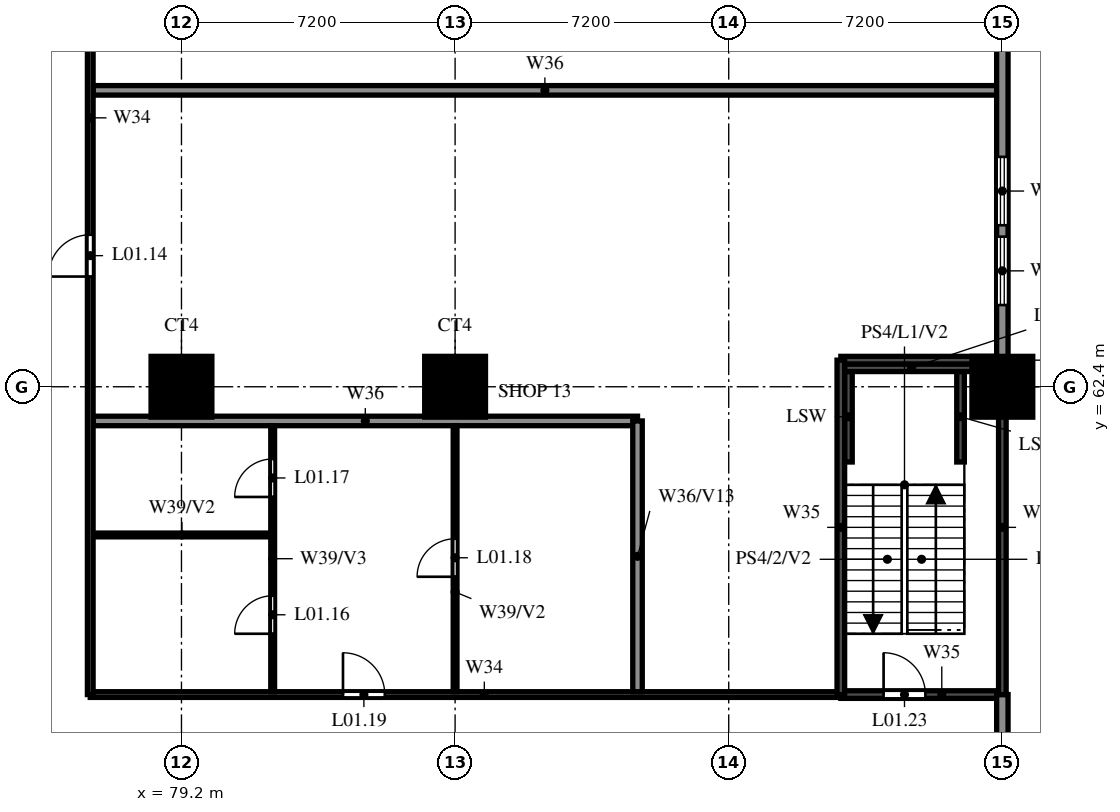
"""IFC4 building model, lengths in metres.
Left out: names, types, materials, properties, quantities, classifications, styles, units other than length and angle.
Written with IfcOpenShell. Run it as: python <this file> out.ifc"""

import sys

from ifc_helpers import new_model, si_unit, direction, frame, frame_2d, origin, origin_2d, place, context, subcontext, project, spatial, rectangle, circle, extrude, source, transform, mapped, element, fill, save


model = new_model("IFC4")
c1 = context("Model", 3, precision=1e-05, world=origin(), true_north=direction((0.0, 1.0)))
c2 = subcontext(c1, "Body", "Model", "MODEL_VIEW")
j1 = project(units=[si_unit("LENGTHUNIT", "METRE"), si_unit("PLANEANGLEUNIT", "RADIAN")], contexts=[c1])
p1 = place(None, origin())
s1 = spatial("IfcSite", under=j1, at=p1, CompositionType="ELEMENT")
p2 = place(p1, origin())
s2 = spatial("IfcBuilding", under=s1, at=p2, CompositionType="ELEMENT")
p3 = place(p2, frame((0.0, 0.0, 7.8)))
s3 = spatial("IfcBuildingStorey", under=s2, at=p3, CompositionType="ELEMENT", Elevation=7.8)
m1 = source(origin(), c2, "Body", "SweptSolid", [
    extrude(circle(Radius=0.8, at=origin_2d()), origin(), (0.0, 0.0, 1.0), 5.0),
])
for number, where, z_axis, x_axis in (
    (1, (79.2, 62.4, 0.0), (0.0, 0.0, 1.0), (1.0, 0.0, 0.0)),
    (2, (86.4, 62.4, 0.0), (0.0, 0.0, 1.0), (1.0, 0.0, 0.0)),
    (3, (100.8, 62.4, 0.0), (0.0, 0.0, 1.0), (1.0, 0.0, 0.0)),
):
    element("IfcColumn", number, at=place(p3, frame(where, z_axis=z_axis, x_axis=x_axis)), inside=s3, PredefinedType="COLUMN", context=c2, shape_type="MappedRepresentation", body=[
        mapped(m1, transform((0.0, 0.0, 0.0))),
    ])
for number, where, z_axis, x_axis in (
    (4, (96.75, 60.42, 0.0), (0.0, 0.0, 1.0), (0.0, 1.0, 0.0)),
    (5, (99.7, 60.42, 0.0), (0.0, 0.0, 1.0), (0.0, 1.0, 0.0)),
):
    element("IfcWall", number, at=place(p3, frame(where, z_axis=z_axis, x_axis=x_axis)), inside=s3, PredefinedType="SOLIDWALL", context=c2, shape_type="SweptSolid", body=[
        extrude(rectangle(XDim=2.38, YDim=0.2, at=frame_2d((1.19, 0.0))), origin(), (0.0, 0.0, 1.0), 2.5),
    ])
p4 = place(p3, frame((96.65, 62.9, 0.0), z_axis=(0.0, 0.0, 1.0), x_axis=(1.0, 0.0, 0.0)))
e6 = element("IfcWall", 6, at=p4, inside=s3, PredefinedType="SOLIDWALL", context=c2, shape_type="SweptSolid", body=[
    extrude(rectangle(XDim=3.526, YDim=0.2, at=frame_2d((1.763, 0.0))), origin(), (0.0, 0.0, 1.0), 2.5),
])
p5 = place(p3, frame((76.8, 54.3, 0.0), z_axis=(0.0, 0.0, 1.0), x_axis=(1.0, 0.0, 0.0)))
e7 = element("IfcWall", 7, at=p5, inside=s3, PredefinedType="PARTITIONING", context=c2, shape_type="SweptSolid", body=[
    extrude(rectangle(XDim=19.75, YDim=0.15, at=frame_2d((9.875, 0.0))), origin(), (0.0, 0.0, 1.0), 3.8),
])
p6 = place(p5, frame((6.65, 0.0, 0.0)))
e8 = element("IfcOpeningElement", 8, at=p6, cuts=e7, PredefinedType="OPENING", context=c2, shape_type="SweptSolid", body=[
    extrude(rectangle(XDim=1.1, YDim=2.1, at=frame_2d((0.55, 1.05))), frame((0.0, 0.085, 0.0), z_axis=(0.0, -1.0, 0.0), x_axis=(1.0, 0.0, 0.0)), (0.0, 0.0, 1.0), 0.17),
])
p7 = place(p3, frame((96.55, 54.3, 0.0), z_axis=(0.0, 0.0, 1.0), x_axis=(1.0, 0.0, 0.0)))
e9 = element("IfcWall", 9, at=p7, inside=s3, PredefinedType="SOLIDWALL", context=c2, shape_type="SweptSolid", body=[
    extrude(rectangle(XDim=4.25, YDim=0.2, at=frame_2d((2.125, 0.0))), origin(), (0.0, 0.0, 1.0), 5.0),
])
p8 = place(p7, frame((1.125, 0.0, 0.0)))
e10 = element("IfcOpeningElement", 10, at=p8, cuts=e9, PredefinedType="OPENING", context=c2, shape_type="SweptSolid", body=[
    extrude(rectangle(XDim=1.1, YDim=2.1, at=frame_2d((0.55, 1.05))), frame((0.0, 0.11, 0.0), z_axis=(0.0, -1.0, 0.0), x_axis=(1.0, 0.0, 0.0)), (0.0, 0.0, 1.0), 0.22),
])
p9 = place(p3, frame((76.875, 58.5, 0.0), z_axis=(0.0, 0.0, 1.0), x_axis=(1.0, 0.0, 0.0)))
e11 = element("IfcWall", 11, at=p9, inside=s3, PredefinedType="PARTITIONING", context=c2, shape_type="SweptSolid", body=[
    extrude(rectangle(XDim=4.675, YDim=0.1, at=frame_2d((2.337, 0.0))), origin(), (0.0, 0.0, 1.0), 3.8),
])
p10 = place(p3, frame((76.875, 61.5, 0.0), z_axis=(0.0, 0.0, 1.0), x_axis=(1.0, 0.0, 0.0)))
e12 = element("IfcWall", 12, at=p10, inside=s3, PredefinedType="SOLIDWALL", context=c2, shape_type="SweptSolid", body=[
    extrude(rectangle(XDim=14.325, YDim=0.25, at=frame_2d((7.163, 0.0))), origin(), (0.0, 0.0, 1.0), 3.8),
])
p11 = place(p3, frame((96.55, 63.1, 0.0), z_axis=(0.0, 0.0, 1.0), x_axis=(1.0, 0.0, 0.0)))
e13 = element("IfcWall", 13, at=p11, inside=s3, PredefinedType="SOLIDWALL", context=c2, shape_type="SweptSolid", body=[
    extrude(rectangle(XDim=4.25, YDim=0.2, at=frame_2d((2.125, 0.0))), origin(), (0.0, 0.0, 1.0), 5.0),
])
p12 = place(p3, frame((76.875, 70.2, 0.0), z_axis=(0.0, 0.0, 1.0), x_axis=(1.0, 0.0, 0.0)))
e14 = element("IfcWall", 14, at=p12, inside=s3, PredefinedType="SOLIDWALL", context=c2, shape_type="SweptSolid", body=[
    extrude(rectangle(XDim=23.775, YDim=0.25, at=frame_2d((11.887, 0.0))), origin(), (0.0, 0.0, 1.0), 3.8),
])
p13 = place(p3, frame((76.8, 54.3, 0.0), z_axis=(0.0, 0.0, 1.0), x_axis=(0.0, 1.0, 0.0)))
e15 = element("IfcWall", 15, at=p13, inside=s3, PredefinedType="PARTITIONING", context=c2, shape_type="SweptSolid", body=[
    extrude(rectangle(XDim=31.95, YDim=0.15, at=frame_2d((15.975, 0.0))), origin(), (0.0, 0.0, 1.0), 3.8),
])
p14 = place(p13, frame((11.0, 0.0, 0.0)))
e16 = element("IfcOpeningElement", 16, at=p14, cuts=e15, PredefinedType="OPENING", context=c2, shape_type="SweptSolid", body=[
    extrude(rectangle(XDim=1.1, YDim=2.1, at=frame_2d((0.55, 1.05))), frame((0.0, 0.085, 0.0), z_axis=(0.0, -1.0, 0.0), x_axis=(1.0, 0.0, 0.0)), (0.0, 0.0, 1.0), 0.17),
])
p15 = place(p13, frame((23.45, 0.0, 0.0)))
e17 = element("IfcOpeningElement", 17, at=p15, cuts=e15, PredefinedType="OPENING", context=c2, shape_type="SweptSolid", body=[
    extrude(rectangle(XDim=1.1, YDim=2.1, at=frame_2d((0.55, 1.05))), frame((0.0, 0.085, 0.0), z_axis=(0.0, -1.0, 0.0), x_axis=(1.0, 0.0, 0.0)), (0.0, 0.0, 1.0), 0.17),
])
p16 = place(p3, frame((81.6, 54.375, 0.0), z_axis=(0.0, 0.0, 1.0), x_axis=(0.0, 1.0, 0.0)))
e18 = element("IfcWall", 18, at=p16, inside=s3, PredefinedType="PARTITIONING", context=c2, shape_type="SweptSolid", body=[
    extrude(rectangle(XDim=7.0, YDim=0.1, at=frame_2d((3.5, 0.0))), origin(), (0.0, 0.0, 1.0), 5.0),
])
p17 = place(p16, frame((1.525, 0.0, 0.0)))
e19 = element("IfcOpeningElement", 19, at=p17, cuts=e18, PredefinedType="OPENING", context=c2, shape_type="SweptSolid", body=[
    extrude(rectangle(XDim=1.0, YDim=2.1, at=frame_2d((0.5, 1.05))), frame((0.0, 0.06, 0.0), z_axis=(0.0, -1.0, 0.0), x_axis=(1.0, 0.0, 0.0)), (0.0, 0.0, 1.0), 0.12),
])
p18 = place(p16, frame((5.125, 0.0, 0.0)))
e20 = element("IfcOpeningElement", 20, at=p18, cuts=e18, PredefinedType="OPENING", context=c2, shape_type="SweptSolid", body=[
    extrude(rectangle(XDim=1.0, YDim=2.1, at=frame_2d((0.5, 1.05))), frame((0.0, 0.06, 0.0), z_axis=(0.0, -1.0, 0.0), x_axis=(1.0, 0.0, 0.0)), (0.0, 0.0, 1.0), 0.12),
])
p19 = place(p3, frame((86.4, 54.375, 0.0), z_axis=(0.0, 0.0, 1.0), x_axis=(0.0, 1.0, 0.0)))
e21 = element("IfcWall", 21, at=p19, inside=s3, PredefinedType="PARTITIONING", context=c2, shape_type="SweptSolid", body=[
    extrude(rectangle(XDim=7.0, YDim=0.1, at=frame_2d((3.5, 0.0))), origin(), (0.0, 0.0, 1.0), 3.8),
])
p20 = place(p19, frame((3.025, 0.0, 0.0)))
e22 = element("IfcOpeningElement", 22, at=p20, cuts=e21, PredefinedType="OPENING", context=c2, shape_type="SweptSolid", body=[
    extrude(rectangle(XDim=1.0, YDim=2.1, at=frame_2d((0.5, 1.05))), frame((0.0, 0.06, 0.0), z_axis=(0.0, -1.0, 0.0), x_axis=(1.0, 0.0, 0.0)), (0.0, 0.0, 1.0), 0.12),
])
p21 = place(p3, frame((91.2, 54.375, 0.0), z_axis=(0.0, 0.0, 1.0), x_axis=(0.0, 1.0, 0.0)))
e23 = element("IfcWall", 23, at=p21, inside=s3, PredefinedType="SOLIDWALL", context=c2, shape_type="SweptSolid", body=[
    extrude(rectangle(XDim=7.125, YDim=0.25, at=frame_2d((3.562, 0.0))), origin(), (0.0, 0.0, 1.0), 5.0),
])
p22 = place(p3, frame((96.55, 54.3, 0.0), z_axis=(0.0, 0.0, 1.0), x_axis=(0.0, 1.0, 0.0)))
e24 = element("IfcWall", 24, at=p22, inside=s3, PredefinedType="SOLIDWALL", context=c2, shape_type="SweptSolid", body=[
    extrude(rectangle(XDim=8.8, YDim=0.2, at=frame_2d((4.4, 0.0))), origin(), (0.0, 0.0, 1.0), 5.0),
])
p23 = place(p3, frame((100.8, 51.1, 0.0), z_axis=(0.0, 0.0, 1.0), x_axis=(0.0, 1.0, 0.0)))
e25 = element("IfcWall", 25, at=p23, inside=s3, PredefinedType="SOLIDWALL", context=c2, shape_type="SweptSolid", body=[
    extrude(rectangle(XDim=3.2, YDim=0.3, at=frame_2d((1.6, 0.0))), origin(), (0.0, 0.0, 1.0), 5.0),
])
p24 = place(p3, frame((100.8, 63.1, 0.0), z_axis=(0.0, 0.0, 1.0), x_axis=(0.0, 1.0, 0.0)))
e26 = element("IfcWall", 26, at=p24, inside=s3, PredefinedType="SOLIDWALL", context=c2, shape_type="SweptSolid", body=[
    extrude(rectangle(XDim=23.3, YDim=0.3, at=frame_2d((11.65, 0.0))), origin(), (0.0, 0.0, 1.0), 5.0),
])
p25 = place(p24, frame((1.45, 0.0, 0.6)))
e27 = element("IfcOpeningElement", 27, at=p25, cuts=e26, PredefinedType="OPENING", context=c2, shape_type="SweptSolid", body=[
    extrude(rectangle(XDim=1.8, YDim=2.4, at=frame_2d((0.9, 1.2))), frame((0.0, 0.16, 0.0), z_axis=(0.0, -1.0, 0.0), x_axis=(1.0, 0.0, 0.0)), (0.0, 0.0, 1.0), 0.32),
])
p26 = place(p24, frame((3.55, 0.0, 0.6)))
e28 = element("IfcOpeningElement", 28, at=p26, cuts=e26, PredefinedType="OPENING", context=c2, shape_type="SweptSolid", body=[
    extrude(rectangle(XDim=1.8, YDim=2.4, at=frame_2d((0.9, 1.2))), frame((0.0, 0.16, 0.0), z_axis=(0.0, -1.0, 0.0), x_axis=(1.0, 0.0, 0.0)), (0.0, 0.0, 1.0), 0.32),
])
p27 = place(p24, frame((8.65, 0.0, 0.6)))
e29 = element("IfcOpeningElement", 29, at=p27, cuts=e26, PredefinedType="OPENING", context=c2, shape_type="SweptSolid", body=[
    extrude(rectangle(XDim=1.8, YDim=2.4, at=frame_2d((0.9, 1.2))), frame((0.0, 0.16, 0.0), z_axis=(0.0, -1.0, 0.0), x_axis=(1.0, 0.0, 0.0)), (0.0, 0.0, 1.0), 0.32),
])
p28 = place(p24, frame((15.85, 0.0, 0.6)))
e30 = element("IfcOpeningElement", 30, at=p28, cuts=e26, PredefinedType="OPENING", context=c2, shape_type="SweptSolid", body=[
    extrude(rectangle(XDim=1.8, YDim=2.4, at=frame_2d((0.9, 1.2))), frame((0.0, 0.16, 0.0), z_axis=(0.0, -1.0, 0.0), x_axis=(1.0, 0.0, 0.0)), (0.0, 0.0, 1.0), 0.32),
])
p29 = place(p24, frame((19.45, 0.0, 0.6)))
e31 = element("IfcOpeningElement", 31, at=p29, cuts=e26, PredefinedType="OPENING", context=c2, shape_type="SweptSolid", body=[
    extrude(rectangle(XDim=1.8, YDim=2.4, at=frame_2d((0.9, 1.2))), frame((0.0, 0.16, 0.0), z_axis=(0.0, -1.0, 0.0), x_axis=(1.0, 0.0, 0.0)), (0.0, 0.0, 1.0), 0.32),
])
p30 = place(p3, frame((100.8, 54.3, 0.0), z_axis=(0.0, 0.0, 1.0), x_axis=(0.0, 1.0, 0.0)))
e32 = element("IfcWall", 32, at=p30, inside=s3, PredefinedType="SOLIDWALL", context=c2, shape_type="SweptSolid", body=[
    extrude(rectangle(XDim=8.8, YDim=0.2, at=frame_2d((4.4, 0.0))), origin(), (0.0, 0.0, 1.0), 5.0),
])
p31 = place(p14, origin())
e33 = element("IfcDoor", 33, at=p31, inside=s3, OperationType="SINGLE_SWING_LEFT", PredefinedType="DOOR", context=c2, shape_type="SweptSolid", body=[
    extrude(rectangle(XDim=1.1, YDim=2.1, at=frame_2d((0.55, 1.05))), frame((0.0, 0.025, 0.0), z_axis=(0.0, -1.0, 0.0), x_axis=(1.0, 0.0, 0.0)), (0.0, 0.0, 1.0), 0.05),
])
fill(e16, e33)
p32 = place(p17, origin())
e34 = element("IfcDoor", 34, at=p32, inside=s3, OperationType="SINGLE_SWING_LEFT", PredefinedType="DOOR", context=c2, shape_type="SweptSolid", body=[
    extrude(rectangle(XDim=1.0, YDim=2.1, at=frame_2d((0.5, 1.05))), frame((0.0, 0.025, 0.0), z_axis=(0.0, -1.0, 0.0), x_axis=(1.0, 0.0, 0.0)), (0.0, 0.0, 1.0), 0.05),
])
fill(e19, e34)
p33 = place(p18, origin())
e35 = element("IfcDoor", 35, at=p33, inside=s3, OperationType="SINGLE_SWING_RIGHT", PredefinedType="DOOR", context=c2, shape_type="SweptSolid", body=[
    extrude(rectangle(XDim=1.0, YDim=2.1, at=frame_2d((0.5, 1.05))), frame((0.0, 0.025, 0.0), z_axis=(0.0, -1.0, 0.0), x_axis=(1.0, 0.0, 0.0)), (0.0, 0.0, 1.0), 0.05),
])
fill(e20, e35)
p34 = place(p20, origin())
e36 = element("IfcDoor", 36, at=p34, inside=s3, OperationType="SINGLE_SWING_RIGHT", PredefinedType="DOOR", context=c2, shape_type="SweptSolid", body=[
    extrude(rectangle(XDim=1.0, YDim=2.1, at=frame_2d((0.5, 1.05))), frame((0.0, 0.025, 0.0), z_axis=(0.0, -1.0, 0.0), x_axis=(1.0, 0.0, 0.0)), (0.0, 0.0, 1.0), 0.05),
])
fill(e22, e36)
p35 = place(p6, origin())
e37 = element("IfcDoor", 37, at=p35, inside=s3, OperationType="SINGLE_SWING_LEFT", PredefinedType="DOOR", context=c2, shape_type="SweptSolid", body=[
    extrude(rectangle(XDim=1.1, YDim=2.1, at=frame_2d((0.55, 1.05))), frame((0.0, 0.025, 0.0), z_axis=(0.0, -1.0, 0.0), x_axis=(1.0, 0.0, 0.0)), (0.0, 0.0, 1.0), 0.05),
])
fill(e8, e37)
p36 = place(p8, origin())
e38 = element("IfcDoor", 38, at=p36, inside=s3, OperationType="SINGLE_SWING_LEFT", PredefinedType="DOOR", context=c2, shape_type="SweptSolid", body=[
    extrude(rectangle(XDim=1.1, YDim=2.1, at=frame_2d((0.55, 1.05))), frame((0.0, 0.025, 0.0), z_axis=(0.0, -1.0, 0.0), x_axis=(1.0, 0.0, 0.0)), (0.0, 0.0, 1.0), 0.05),
])
fill(e10, e38)
p37 = place(p25, origin())
e39 = element("IfcWindow", 39, at=p37, inside=s3, PartitioningType="DOUBLE_PANEL_VERTICAL", PredefinedType="WINDOW", context=c2, shape_type="SweptSolid", body=[
    extrude(rectangle(XDim=1.8, YDim=2.4, at=frame_2d((0.9, 1.2))), frame((0.0, 0.03, 0.0), z_axis=(0.0, -1.0, 0.0), x_axis=(1.0, 0.0, 0.0)), (0.0, 0.0, 1.0), 0.06),
])
fill(e27, e39)
p38 = place(p26, origin())
e40 = element("IfcWindow", 40, at=p38, inside=s3, PartitioningType="DOUBLE_PANEL_VERTICAL", PredefinedType="WINDOW", context=c2, shape_type="SweptSolid", body=[
    extrude(rectangle(XDim=1.8, YDim=2.4, at=frame_2d((0.9, 1.2))), frame((0.0, 0.03, 0.0), z_axis=(0.0, -1.0, 0.0), x_axis=(1.0, 0.0, 0.0)), (0.0, 0.0, 1.0), 0.06),
])
fill(e28, e40)
save(model, sys.argv[1])
